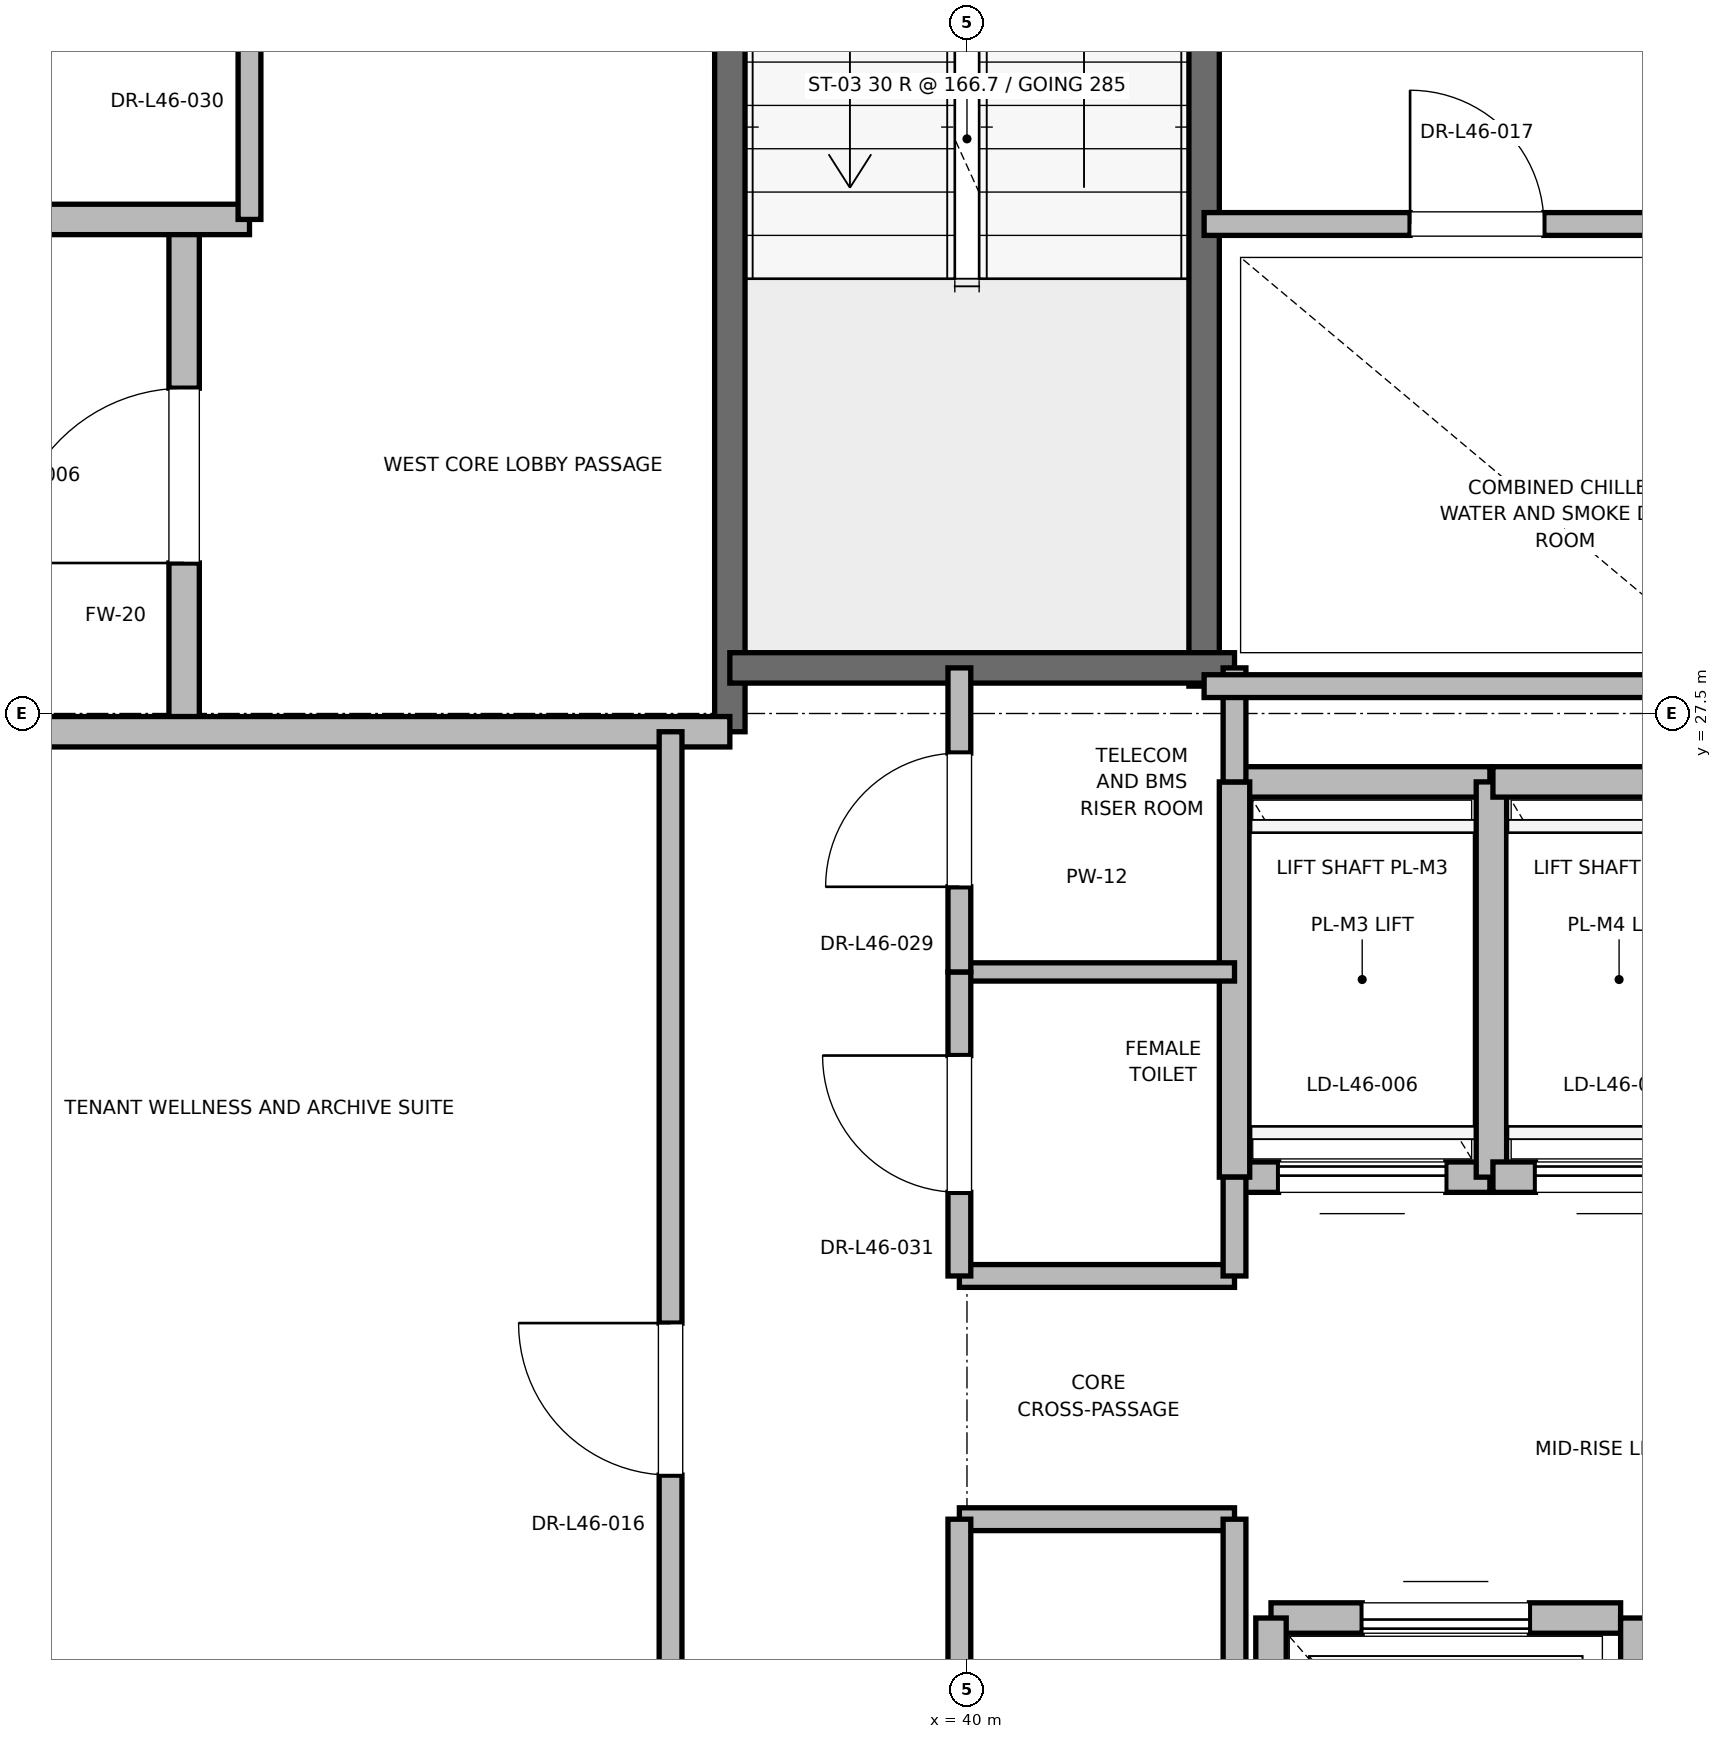
"""IFC4 building model, lengths in metres.
Left out: names, types, materials, properties, quantities, classifications, styles, units other than length and angle.
Written with IfcOpenShell. Run it as: python <this file> out.ifc"""

import sys

from ifc_helpers import new_model, si_unit, direction, frame, frame_2d, origin, place, context, subcontext, project, spatial, rectangle, extrude, element, fill, save


model = new_model("IFC4")
c1 = context("Model", 3, precision=1e-05, world=origin(), true_north=direction((0.0, 1.0)))
c2 = subcontext(c1, "Body", "Model", "MODEL_VIEW")
j1 = project(units=[si_unit("LENGTHUNIT", "METRE"), si_unit("PLANEANGLEUNIT", "RADIAN")], contexts=[c1])
p1 = place(None, origin())
s1 = spatial("IfcSite", under=j1, at=p1, CompositionType="ELEMENT")
p2 = place(p1, origin())
s2 = spatial("IfcBuilding", under=s1, at=p2, CompositionType="ELEMENT")
p3 = place(p2, frame((0.0, 0.0, 200.2)))
s3 = spatial("IfcBuildingStorey", under=s2, at=p3, CompositionType="ELEMENT", Elevation=200.2)
p4 = place(p3, frame((38.44, 27.38, 0.0), z_axis=(0.0, 0.0, 1.0), x_axis=(0.0, 1.0, 0.0)))
e1 = element("IfcWall", 1, at=p4, inside=s3, PredefinedType="SOLIDWALL", context=c2, shape_type="SweptSolid", body=[
    extrude(rectangle(XDim=8.87, YDim=0.2, at=frame_2d((4.435, 0.0))), origin(), (0.0, 0.0, 1.0), 4.775),
])
p5 = place(p3, frame((41.56, 27.68, 0.0), z_axis=(0.0, 0.0, 1.0), x_axis=(0.0, 1.0, 0.0)))
e2 = element("IfcWall", 2, at=p5, inside=s3, PredefinedType="SOLIDWALL", context=c2, shape_type="SweptSolid", body=[
    extrude(rectangle(XDim=8.57, YDim=0.2, at=frame_2d((4.285, 0.0))), origin(), (0.0, 0.0, 1.0), 4.775),
])
p6 = place(p3, frame((38.44, 27.8, 0.0), z_axis=(0.0, 0.0, 1.0), x_axis=(1.0, 0.0, 0.0)))
e3 = element("IfcWall", 3, at=p6, inside=s3, PredefinedType="SOLIDWALL", context=c2, shape_type="SweptSolid", body=[
    extrude(rectangle(XDim=3.32, YDim=0.2, at=frame_2d((1.66, 0.0))), origin(), (0.0, 0.0, 1.0), 4.775),
])
p7 = place(p3, frame((34.85, 27.38, 0.0), z_axis=(0.0, 0.0, 1.0), x_axis=(0.0, 1.0, 0.0)))
e4 = element("IfcWall", 4, at=p7, inside=s3, PredefinedType="PARTITIONING", context=c2, shape_type="SweptSolid", body=[
    extrude(rectangle(XDim=3.37, YDim=0.2, at=frame_2d((1.685, 0.0))), origin(), (0.0, 0.0, 1.0), 4.775),
])
p8 = place(p7, frame((1.11, 0.0, 0.0)))
e5 = element("IfcOpeningElement", 5, at=p8, cuts=e4, PredefinedType="OPENING", context=c2, shape_type="SweptSolid", body=[
    extrude(rectangle(XDim=1.15, YDim=2.2, at=frame_2d((0.575, 1.1))), frame((0.0, 0.1, 0.0), z_axis=(0.0, -1.0, 0.0), x_axis=(1.0, 0.0, 0.0)), (0.0, 0.0, 1.0), 0.2),
])
p9 = place(p3, frame((32.82, 27.38, 0.0), z_axis=(0.0, 0.0, 1.0), x_axis=(1.0, 0.0, 0.0)))
e6 = element("IfcWall", 6, at=p9, inside=s3, PredefinedType="PARTITIONING", context=c2, shape_type="SweptSolid", body=[
    extrude(rectangle(XDim=5.62, YDim=0.2, at=frame_2d((2.81, 0.0))), origin(), (0.0, 0.0, 1.0), 4.775),
])
p10 = place(p3, frame((32.15, 30.75, 0.0), z_axis=(0.0, 0.0, 1.0), x_axis=(1.0, 0.0, 0.0)))
e7 = element("IfcWall", 7, at=p10, inside=s3, PredefinedType="PARTITIONING", context=c2, shape_type="SweptSolid", body=[
    extrude(rectangle(XDim=3.13, YDim=0.2, at=frame_2d((1.565, 0.0))), origin(), (0.0, 0.0, 1.0), 4.775),
])
p11 = place(p3, frame((44.3, 21.55, 0.0), z_axis=(0.0, 0.0, 1.0), x_axis=(-1.0, 0.0, 0.0)))
e8 = element("IfcWall", 8, at=p11, inside=s3, PredefinedType="SOLIDWALL", context=c2, shape_type="SweptSolid", body=[
    extrude(rectangle(XDim=2.3, YDim=0.2, at=frame_2d((1.15, 0.0))), origin(), (0.0, 0.0, 1.0), 4.775),
])
p12 = place(p11, frame((0.6, 0.0, 0.0)))
e9 = element("IfcOpeningElement", 9, at=p12, cuts=e8, PredefinedType="OPENING", context=c2, shape_type="SweptSolid", body=[
    extrude(rectangle(XDim=1.1, YDim=2.2, at=frame_2d((0.55, 1.1))), frame((0.0, 0.1, 0.0), z_axis=(0.0, -1.0, 0.0), x_axis=(1.0, 0.0, 0.0)), (0.0, 0.0, 1.0), 0.2),
])
p13 = place(p3, frame((42.0, 21.55, 0.0), z_axis=(0.0, 0.0, 1.0), x_axis=(0.0, -1.0, 0.0)))
e10 = element("IfcWall", 10, at=p13, inside=s3, PredefinedType="SOLIDWALL", context=c2, shape_type="SweptSolid", body=[
    extrude(rectangle(XDim=2.6, YDim=0.2, at=frame_2d((1.3, 0.0))), origin(), (0.0, 0.0, 1.0), 3.755),
])
p14 = place(p3, frame((44.4, 18.95, 0.0), z_axis=(0.0, 0.0, 1.0), x_axis=(0.0, 1.0, 0.0)))
e11 = element("IfcWall", 11, at=p14, inside=s3, PredefinedType="SOLIDWALL", context=c2, shape_type="SweptSolid", body=[
    extrude(rectangle(XDim=2.6, YDim=0.2, at=frame_2d((1.3, 0.0))), origin(), (0.0, 0.0, 1.0), 4.775),
])
p15 = place(p3, frame((41.76, 24.45, 0.0), z_axis=(0.0, 0.0, 1.0), x_axis=(1.0, 0.0, 0.0)))
e12 = element("IfcWall", 12, at=p15, inside=s3, PredefinedType="SOLIDWALL", context=c2, shape_type="SweptSolid", body=[
    extrude(rectangle(XDim=1.68, YDim=0.2, at=frame_2d((0.84, 0.0))), origin(), (0.0, 0.0, 1.0), 4.775),
])
p16 = place(p15, frame((0.29, 0.0, 0.0)))
e13 = element("IfcOpeningElement", 13, at=p16, cuts=e12, PredefinedType="OPENING", context=c2, shape_type="SweptSolid", body=[
    extrude(rectangle(XDim=1.1, YDim=2.2, at=frame_2d((0.55, 1.1))), frame((0.0, 0.1, 0.0), z_axis=(0.0, -1.0, 0.0), x_axis=(1.0, 0.0, 0.0)), (0.0, 0.0, 1.0), 0.2),
])
p17 = place(p3, frame((43.44, 27.05, 0.0), z_axis=(0.0, 0.0, 1.0), x_axis=(-1.0, 0.0, 0.0)))
e14 = element("IfcWall", 14, at=p17, inside=s3, PredefinedType="SOLIDWALL", context=c2, shape_type="SweptSolid", body=[
    extrude(rectangle(XDim=1.68, YDim=0.2, at=frame_2d((0.84, 0.0))), origin(), (0.0, 0.0, 1.0), 4.775),
])
for number, where, z_axis, x_axis in (
    (15, (41.76, 27.05, 0.0), (0.0, 0.0, 1.0), (0.0, -1.0, 0.0)),
    (16, (43.45, 24.45, 0.0), (0.0, 0.0, 1.0), (0.0, 1.0, 0.0)),
):
    element("IfcWall", number, at=place(p3, frame(where, z_axis=z_axis, x_axis=x_axis)), inside=s3, PredefinedType="SOLIDWALL", context=c2, shape_type="SweptSolid", body=[
        extrude(rectangle(XDim=2.6, YDim=0.2, at=frame_2d((1.3, 0.0))), origin(), (0.0, 0.0, 1.0), 4.775),
    ])
p18 = place(p3, frame((43.46, 24.45, 0.0), z_axis=(0.0, 0.0, 1.0), x_axis=(1.0, 0.0, 0.0)))
e17 = element("IfcWall", 17, at=p18, inside=s3, PredefinedType="SOLIDWALL", context=c2, shape_type="SweptSolid", body=[
    extrude(rectangle(XDim=1.66, YDim=0.2, at=frame_2d((0.83, 0.0))), origin(), (0.0, 0.0, 1.0), 4.775),
])
p19 = place(p18, frame((0.28, 0.0, 0.0)))
e18 = element("IfcOpeningElement", 18, at=p19, cuts=e17, PredefinedType="OPENING", context=c2, shape_type="SweptSolid", body=[
    extrude(rectangle(XDim=1.1, YDim=2.2, at=frame_2d((0.55, 1.1))), frame((0.0, 0.1, 0.0), z_axis=(0.0, -1.0, 0.0), x_axis=(1.0, 0.0, 0.0)), (0.0, 0.0, 1.0), 0.2),
])
p20 = place(p3, frame((45.12, 27.05, 0.0), z_axis=(0.0, 0.0, 1.0), x_axis=(-1.0, 0.0, 0.0)))
e19 = element("IfcWall", 19, at=p20, inside=s3, PredefinedType="SOLIDWALL", context=c2, shape_type="SweptSolid", body=[
    extrude(rectangle(XDim=1.66, YDim=0.2, at=frame_2d((0.83, 0.0))), origin(), (0.0, 0.0, 1.0), 4.775),
])
for number, where, z_axis, x_axis in (
    (20, (39.95, 22.2, 0.0), (0.0, 0.0, 1.0), (1.0, 0.0, 0.0)),
    (21, (39.95, 23.8, 0.0), (0.0, 0.0, 1.0), (1.0, 0.0, 0.0)),
):
    element("IfcWall", number, at=place(p3, frame(where, z_axis=z_axis, x_axis=x_axis)), inside=s3, PredefinedType="PARTITIONING", context=c2, shape_type="SweptSolid", body=[
        extrude(rectangle(XDim=1.81, YDim=0.15, at=frame_2d((0.905, 0.0))), origin(), (0.0, 0.0, 1.0), 2.85),
    ])
p21 = place(p3, frame((39.95, 25.8, 0.0), z_axis=(0.0, 0.0, 1.0), x_axis=(1.0, 0.0, 0.0)))
e22 = element("IfcWall", 22, at=p21, inside=s3, PredefinedType="PARTITIONING", context=c2, shape_type="SweptSolid", body=[
    extrude(rectangle(XDim=1.81, YDim=0.12, at=frame_2d((0.905, 0.0))), origin(), (0.0, 0.0, 1.0), 2.85),
])
p22 = place(p3, frame((41.76, 18.6, 0.0), z_axis=(0.0, 0.0, 1.0), x_axis=(0.0, 1.0, 0.0)))
e23 = element("IfcWall", 23, at=p22, inside=s3, PredefinedType="PARTITIONING", context=c2, shape_type="SweptSolid", body=[
    extrude(rectangle(XDim=3.6, YDim=0.15, at=frame_2d((1.8, 0.0))), origin(), (0.0, 0.0, 1.0), 2.85),
])
p23 = place(p3, frame((41.76, 23.8, 0.0), z_axis=(0.0, 0.0, 1.0), x_axis=(0.0, 1.0, 0.0)))
e24 = element("IfcWall", 24, at=p23, inside=s3, PredefinedType="PARTITIONING", context=c2, shape_type="SweptSolid", body=[
    extrude(rectangle(XDim=0.65, YDim=0.15, at=frame_2d((0.325, 0.0))), origin(), (0.0, 0.0, 1.0), 2.85),
])
p24 = place(p3, frame((41.76, 27.05, 0.0), z_axis=(0.0, 0.0, 1.0), x_axis=(0.0, 1.0, 0.0)))
e25 = element("IfcWall", 25, at=p24, inside=s3, PredefinedType="PARTITIONING", context=c2, shape_type="SweptSolid", body=[
    extrude(rectangle(XDim=0.75, YDim=0.15, at=frame_2d((0.375, 0.0))), origin(), (0.0, 0.0, 1.0), 2.85),
])
p25 = place(p3, frame((39.95, 19.2, 0.0), z_axis=(0.0, 0.0, 1.0), x_axis=(0.0, 1.0, 0.0)))
e26 = element("IfcWall", 26, at=p25, inside=s3, PredefinedType="PARTITIONING", context=c2, shape_type="SweptSolid", body=[
    extrude(rectangle(XDim=3.0, YDim=0.15, at=frame_2d((1.5, 0.0))), origin(), (0.0, 0.0, 1.0), 2.85),
])
p26 = place(p25, frame((1.05, 0.0, 0.0)))
e27 = element("IfcOpeningElement", 27, at=p26, cuts=e26, PredefinedType="OPENING", context=c2, shape_type="SweptSolid", body=[
    extrude(rectangle(XDim=0.9, YDim=2.1, at=frame_2d((0.45, 1.05))), frame((0.0, 0.075, 0.0), z_axis=(0.0, -1.0, 0.0), x_axis=(1.0, 0.0, 0.0)), (0.0, 0.0, 1.0), 0.15),
])
p27 = place(p3, frame((39.95, 23.8, 0.0), z_axis=(0.0, 0.0, 1.0), x_axis=(0.0, 1.0, 0.0)))
e28 = element("IfcWall", 28, at=p27, inside=s3, PredefinedType="PARTITIONING", context=c2, shape_type="SweptSolid", body=[
    extrude(rectangle(XDim=2.0, YDim=0.15, at=frame_2d((1.0, 0.0))), origin(), (0.0, 0.0, 1.0), 2.85),
])
p28 = place(p27, frame((0.55, 0.0, 0.0)))
e29 = element("IfcOpeningElement", 29, at=p28, cuts=e28, PredefinedType="OPENING", context=c2, shape_type="SweptSolid", body=[
    extrude(rectangle(XDim=0.9, YDim=2.1, at=frame_2d((0.45, 1.05))), frame((0.0, 0.075, 0.0), z_axis=(0.0, -1.0, 0.0), x_axis=(1.0, 0.0, 0.0)), (0.0, 0.0, 1.0), 0.15),
])
p29 = place(p3, frame((39.95, 25.8, 0.0), z_axis=(0.0, 0.0, 1.0), x_axis=(0.0, 1.0, 0.0)))
e30 = element("IfcWall", 30, at=p29, inside=s3, PredefinedType="PARTITIONING", context=c2, shape_type="SweptSolid", body=[
    extrude(rectangle(XDim=2.0, YDim=0.15, at=frame_2d((1.0, 0.0))), origin(), (0.0, 0.0, 1.0), 2.85),
])
p30 = place(p29, frame((0.56, 0.0, 0.0)))
e31 = element("IfcOpeningElement", 31, at=p30, cuts=e30, PredefinedType="OPENING", context=c2, shape_type="SweptSolid", body=[
    extrude(rectangle(XDim=0.88, YDim=2.1, at=frame_2d((0.44, 1.05))), frame((0.0, 0.075, 0.0), z_axis=(0.0, -1.0, 0.0), x_axis=(1.0, 0.0, 0.0)), (0.0, 0.0, 1.0), 0.15),
])
p31 = place(p3, frame((35.28, 30.75, 0.0), z_axis=(0.0, 0.0, 1.0), x_axis=(0.0, 1.0, 0.0)))
e32 = element("IfcWall", 32, at=p31, inside=s3, PredefinedType="PARTITIONING", context=c2, shape_type="SweptSolid", body=[
    extrude(rectangle(XDim=3.2, YDim=0.15, at=frame_2d((1.6, 0.0))), origin(), (0.0, 0.0, 1.0), 2.85),
])
p32 = place(p31, frame((1.15, 0.0, 0.0)))
e33 = element("IfcOpeningElement", 33, at=p32, cuts=e32, PredefinedType="OPENING", context=c2, shape_type="SweptSolid", body=[
    extrude(rectangle(XDim=0.9, YDim=2.1, at=frame_2d((0.45, 1.05))), frame((0.0, 0.075, 0.0), z_axis=(0.0, -1.0, 0.0), x_axis=(1.0, 0.0, 0.0)), (0.0, 0.0, 1.0), 0.15),
])
p33 = place(p3, frame((38.05, 18.6, 0.0), z_axis=(0.0, 0.0, 1.0), x_axis=(0.0, 1.0, 0.0)))
e34 = element("IfcWall", 34, at=p33, inside=s3, PredefinedType="PARTITIONING", context=c2, shape_type="SweptSolid", body=[
    extrude(rectangle(XDim=8.78, YDim=0.15, at=frame_2d((4.39, 0.0))), origin(), (0.0, 0.0, 1.0), 2.85),
])
p34 = place(p33, frame((3.89, 0.0, 0.0)))
e35 = element("IfcOpeningElement", 35, at=p34, cuts=e34, PredefinedType="OPENING", context=c2, shape_type="SweptSolid", body=[
    extrude(rectangle(XDim=1.0, YDim=2.15, at=frame_2d((0.5, 1.075))), frame((0.0, 0.075, 0.0), z_axis=(0.0, -1.0, 0.0), x_axis=(1.0, 0.0, 0.0)), (0.0, 0.0, 1.0), 0.15),
])
p35 = place(p3, frame((41.56, 27.68, 0.0), z_axis=(0.0, 0.0, 1.0), x_axis=(1.0, 0.0, 0.0)))
e36 = element("IfcWall", 36, at=p35, inside=s3, PredefinedType="PARTITIONING", context=c2, shape_type="SweptSolid", body=[
    extrude(rectangle(XDim=3.59, YDim=0.15, at=frame_2d((1.795, 0.0))), origin(), (0.0, 0.0, 1.0), 2.85),
])
p36 = place(p3, frame((41.56, 30.72, 0.0), z_axis=(0.0, 0.0, 1.0), x_axis=(1.0, 0.0, 0.0)))
e37 = element("IfcWall", 37, at=p36, inside=s3, PredefinedType="PARTITIONING", context=c2, shape_type="SweptSolid", body=[
    extrude(rectangle(XDim=3.59, YDim=0.15, at=frame_2d((1.795, 0.0))), origin(), (0.0, 0.0, 1.0), 2.85),
])
p37 = place(p36, frame((1.355, 0.0, 0.0)))
e38 = element("IfcOpeningElement", 38, at=p37, cuts=e37, PredefinedType="OPENING", context=c2, shape_type="SweptSolid", body=[
    extrude(rectangle(XDim=0.88, YDim=2.1, at=frame_2d((0.44, 1.05))), frame((0.0, 0.075, 0.0), z_axis=(0.0, -1.0, 0.0), x_axis=(1.0, 0.0, 0.0)), (0.0, 0.0, 1.0), 0.15),
])
p38 = place(p8, origin())
e39 = element("IfcDoor", 39, at=p38, inside=s3, OperationType="SINGLE_SWING_LEFT", PredefinedType="DOOR", context=c2, shape_type="SweptSolid", body=[
    extrude(rectangle(XDim=1.15, YDim=2.2, at=frame_2d((0.575, 1.1))), frame((0.0, 0.025, 0.0), z_axis=(0.0, -1.0, 0.0), x_axis=(1.0, 0.0, 0.0)), (0.0, 0.0, 1.0), 0.05),
])
fill(e5, e39)
p39 = place(p12, origin())
e40 = element("IfcDoor", 40, at=p39, inside=s3, OperationType="SLIDING_TO_RIGHT", PredefinedType="DOOR", context=c2, shape_type="SweptSolid", body=[
    extrude(rectangle(XDim=1.1, YDim=2.2, at=frame_2d((0.55, 1.1))), frame((0.0, 0.025, 0.0), z_axis=(0.0, -1.0, 0.0), x_axis=(1.0, 0.0, 0.0)), (0.0, 0.0, 1.0), 0.05),
])
fill(e9, e40)
p40 = place(p16, origin())
e41 = element("IfcDoor", 41, at=p40, inside=s3, OperationType="SLIDING_TO_RIGHT", PredefinedType="DOOR", context=c2, shape_type="SweptSolid", body=[
    extrude(rectangle(XDim=1.1, YDim=2.2, at=frame_2d((0.55, 1.1))), frame((0.0, 0.025, 0.0), z_axis=(0.0, -1.0, 0.0), x_axis=(1.0, 0.0, 0.0)), (0.0, 0.0, 1.0), 0.05),
])
fill(e13, e41)
p41 = place(p19, origin())
e42 = element("IfcDoor", 42, at=p41, inside=s3, OperationType="SLIDING_TO_RIGHT", PredefinedType="DOOR", context=c2, shape_type="SweptSolid", body=[
    extrude(rectangle(XDim=1.1, YDim=2.2, at=frame_2d((0.55, 1.1))), frame((0.0, 0.025, 0.0), z_axis=(0.0, -1.0, 0.0), x_axis=(1.0, 0.0, 0.0)), (0.0, 0.0, 1.0), 0.05),
])
fill(e18, e42)
p42 = place(p28, origin())
e43 = element("IfcDoor", 43, at=p42, inside=s3, OperationType="SINGLE_SWING_RIGHT", PredefinedType="DOOR", context=c2, shape_type="SweptSolid", body=[
    extrude(rectangle(XDim=0.9, YDim=2.1, at=frame_2d((0.45, 1.05))), frame((0.0, 0.025, 0.0), z_axis=(0.0, -1.0, 0.0), x_axis=(1.0, 0.0, 0.0)), (0.0, 0.0, 1.0), 0.05),
])
fill(e29, e43)
p43 = place(p30, origin())
e44 = element("IfcDoor", 44, at=p43, inside=s3, OperationType="SINGLE_SWING_LEFT", PredefinedType="DOOR", context=c2, shape_type="SweptSolid", body=[
    extrude(rectangle(XDim=0.88, YDim=2.1, at=frame_2d((0.44, 1.05))), frame((0.0, 0.025, 0.0), z_axis=(0.0, -1.0, 0.0), x_axis=(1.0, 0.0, 0.0)), (0.0, 0.0, 1.0), 0.05),
])
fill(e31, e44)
p44 = place(p34, origin())
e45 = element("IfcDoor", 45, at=p44, inside=s3, OperationType="SINGLE_SWING_RIGHT", PredefinedType="DOOR", context=c2, shape_type="SweptSolid", body=[
    extrude(rectangle(XDim=1.0, YDim=2.15, at=frame_2d((0.5, 1.075))), frame((0.0, 0.025, 0.0), z_axis=(0.0, -1.0, 0.0), x_axis=(1.0, 0.0, 0.0)), (0.0, 0.0, 1.0), 0.05),
])
fill(e35, e45)
p45 = place(p37, origin())
e46 = element("IfcDoor", 46, at=p45, inside=s3, OperationType="SINGLE_SWING_LEFT", PredefinedType="DOOR", context=c2, shape_type="SweptSolid", body=[
    extrude(rectangle(XDim=0.88, YDim=2.1, at=frame_2d((0.44, 1.05))), frame((0.0, 0.025, 0.0), z_axis=(0.0, -1.0, 0.0), x_axis=(1.0, 0.0, 0.0)), (0.0, 0.0, 1.0), 0.05),
])
fill(e38, e46)
save(model, sys.argv[1])
